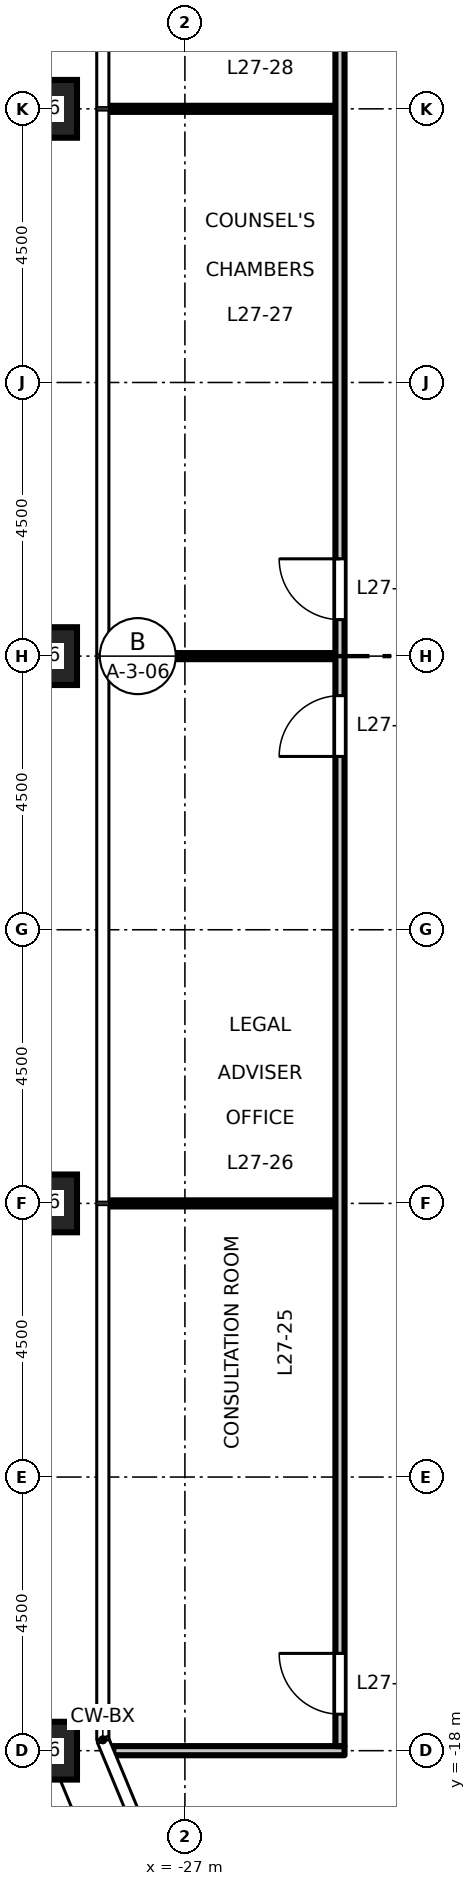
"""IFC4 building model, lengths in metres.
Left out: names, types, materials, properties, quantities, classifications, styles, units other than length and angle.
Written with IfcOpenShell. Run it as: python <this file> out.ifc"""

import sys

from ifc_helpers import new_model, si_unit, direction, frame, frame_2d, origin, origin_2d, place, context, subcontext, project, spatial, rectangle, hollow_rectangle, extrude, element, fill, save


model = new_model("IFC4")
c1 = context("Model", 3, precision=1e-05, world=origin(), true_north=direction((0.0, 1.0)))
c2 = subcontext(c1, "Body", "Model", "MODEL_VIEW")
j1 = project(units=[si_unit("LENGTHUNIT", "METRE"), si_unit("PLANEANGLEUNIT", "RADIAN")], contexts=[c1])
p1 = place(None, origin())
s1 = spatial("IfcSite", under=j1, at=p1, CompositionType="ELEMENT")
p2 = place(p1, origin())
s2 = spatial("IfcBuilding", under=s1, at=p2, CompositionType="ELEMENT")
p3 = place(p2, frame((0.0, 0.0, 127.2)))
s3 = spatial("IfcBuildingStorey", under=s2, at=p3, CompositionType="ELEMENT", Elevation=127.2)
for number, where, z_axis, x_axis in (
    (1, (-29.25, 9.0, 0.0), (0.0, 0.0, 1.0), (1.0, 0.0, 0.0)),
    (2, (-29.25, 0.0, 0.0), (0.0, 0.0, 1.0), (1.0, 0.0, 0.0)),
    (3, (-29.25, -9.0, 0.0), (0.0, 0.0, 1.0), (1.0, 0.0, 0.0)),
    (4, (-29.25, -18.0, 0.0), (0.0, 0.0, 1.0), (1.0, 0.0, 0.0)),
):
    element("IfcColumn", number, at=place(p3, frame(where, z_axis=z_axis, x_axis=x_axis)), inside=s3, PredefinedType="COLUMN", context=c2, shape_type="SweptSolid", body=[
        extrude(hollow_rectangle(XDim=0.95, YDim=0.95, WallThickness=0.055, at=origin_2d()), origin(), (0.0, 0.0, 1.0), 4.5),
    ])
p4 = place(p3, frame((-28.178, -18.0, 0.0), z_axis=(0.0, 0.0, 1.0), x_axis=(1.0, 0.0, 0.0)))
e5 = element("IfcWall", 5, at=p4, inside=s3, PredefinedType="PARTITIONING", context=c2, shape_type="SweptSolid", body=[
    extrude(rectangle(XDim=3.803, YDim=0.15, at=frame_2d((1.901, 0.0))), origin(), (0.0, 0.0, 1.0), 4.35),
])
for number, where, z_axis, x_axis in (
    (6, (-28.26, -9.0, 0.0), (0.0, 0.0, 1.0), (1.0, 0.0, 0.0)),
    (7, (-28.26, 0.0, 0.0), (0.0, 0.0, 1.0), (1.0, 0.0, 0.0)),
    (8, (-28.26, 9.0, 0.0), (0.0, 0.0, 1.0), (1.0, 0.0, 0.0)),
):
    element("IfcWall", number, at=place(p3, frame(where, z_axis=z_axis, x_axis=x_axis)), inside=s3, PredefinedType="PARTITIONING", context=c2, shape_type="SweptSolid", body=[
        extrude(rectangle(XDim=3.735, YDim=0.1, at=frame_2d((1.868, 0.0))), origin(), (0.0, 0.0, 1.0), 4.35),
    ])
p5 = place(p3, frame((-24.45, -17.925, 0.0), z_axis=(0.0, 0.0, 1.0), x_axis=(0.0, 1.0, 0.0)))
e9 = element("IfcWall", 9, at=p5, inside=s3, PredefinedType="PARTITIONING", context=c2, shape_type="SweptSolid", body=[
    extrude(rectangle(XDim=35.85, YDim=0.15, at=frame_2d((17.925, 0.0))), origin(), (0.0, 0.0, 1.0), 4.35),
])
p6 = place(p5, frame((0.525, 0.0, 0.0)))
e10 = element("IfcOpeningElement", 10, at=p6, cuts=e9, PredefinedType="OPENING", context=c2, shape_type="SweptSolid", body=[
    extrude(rectangle(XDim=1.0, YDim=2.1, at=frame_2d((0.5, 1.05))), frame((0.0, 0.085, 0.0), z_axis=(0.0, -1.0, 0.0), x_axis=(1.0, 0.0, 0.0)), (0.0, 0.0, 1.0), 0.17),
])
p7 = place(p5, frame((16.275, 0.0, 0.0)))
e11 = element("IfcOpeningElement", 11, at=p7, cuts=e9, PredefinedType="OPENING", context=c2, shape_type="SweptSolid", body=[
    extrude(rectangle(XDim=1.0, YDim=2.1, at=frame_2d((0.5, 1.05))), frame((0.0, 0.085, 0.0), z_axis=(0.0, -1.0, 0.0), x_axis=(1.0, 0.0, 0.0)), (0.0, 0.0, 1.0), 0.17),
])
p8 = place(p5, frame((18.525, 0.0, 0.0)))
e12 = element("IfcOpeningElement", 12, at=p8, cuts=e9, PredefinedType="OPENING", context=c2, shape_type="SweptSolid", body=[
    extrude(rectangle(XDim=1.0, YDim=2.1, at=frame_2d((0.5, 1.05))), frame((0.0, 0.085, 0.0), z_axis=(0.0, -1.0, 0.0), x_axis=(1.0, 0.0, 0.0)), (0.0, 0.0, 1.0), 0.17),
])
p9 = place(p5, frame((34.275, 0.0, 0.0)))
e13 = element("IfcOpeningElement", 13, at=p9, cuts=e9, PredefinedType="OPENING", context=c2, shape_type="SweptSolid", body=[
    extrude(rectangle(XDim=1.0, YDim=2.1, at=frame_2d((0.5, 1.05))), frame((0.0, 0.085, 0.0), z_axis=(0.0, -1.0, 0.0), x_axis=(1.0, 0.0, 0.0)), (0.0, 0.0, 1.0), 0.17),
])
p10 = place(p6, origin())
e14 = element("IfcDoor", 14, at=p10, inside=s3, OperationType="SINGLE_SWING_RIGHT", PredefinedType="DOOR", context=c2, shape_type="SweptSolid", body=[
    extrude(rectangle(XDim=1.0, YDim=2.1, at=frame_2d((0.5, 1.05))), frame((0.0, 0.025, 0.0), z_axis=(0.0, -1.0, 0.0), x_axis=(1.0, 0.0, 0.0)), (0.0, 0.0, 1.0), 0.05),
])
fill(e10, e14)
p11 = place(p7, origin())
e15 = element("IfcDoor", 15, at=p11, inside=s3, OperationType="SINGLE_SWING_LEFT", PredefinedType="DOOR", context=c2, shape_type="SweptSolid", body=[
    extrude(rectangle(XDim=1.0, YDim=2.1, at=frame_2d((0.5, 1.05))), frame((0.0, 0.025, 0.0), z_axis=(0.0, -1.0, 0.0), x_axis=(1.0, 0.0, 0.0)), (0.0, 0.0, 1.0), 0.05),
])
fill(e11, e15)
p12 = place(p8, origin())
e16 = element("IfcDoor", 16, at=p12, inside=s3, OperationType="SINGLE_SWING_RIGHT", PredefinedType="DOOR", context=c2, shape_type="SweptSolid", body=[
    extrude(rectangle(XDim=1.0, YDim=2.1, at=frame_2d((0.5, 1.05))), frame((0.0, 0.025, 0.0), z_axis=(0.0, -1.0, 0.0), x_axis=(1.0, 0.0, 0.0)), (0.0, 0.0, 1.0), 0.05),
])
fill(e12, e16)
save(model, sys.argv[1])
